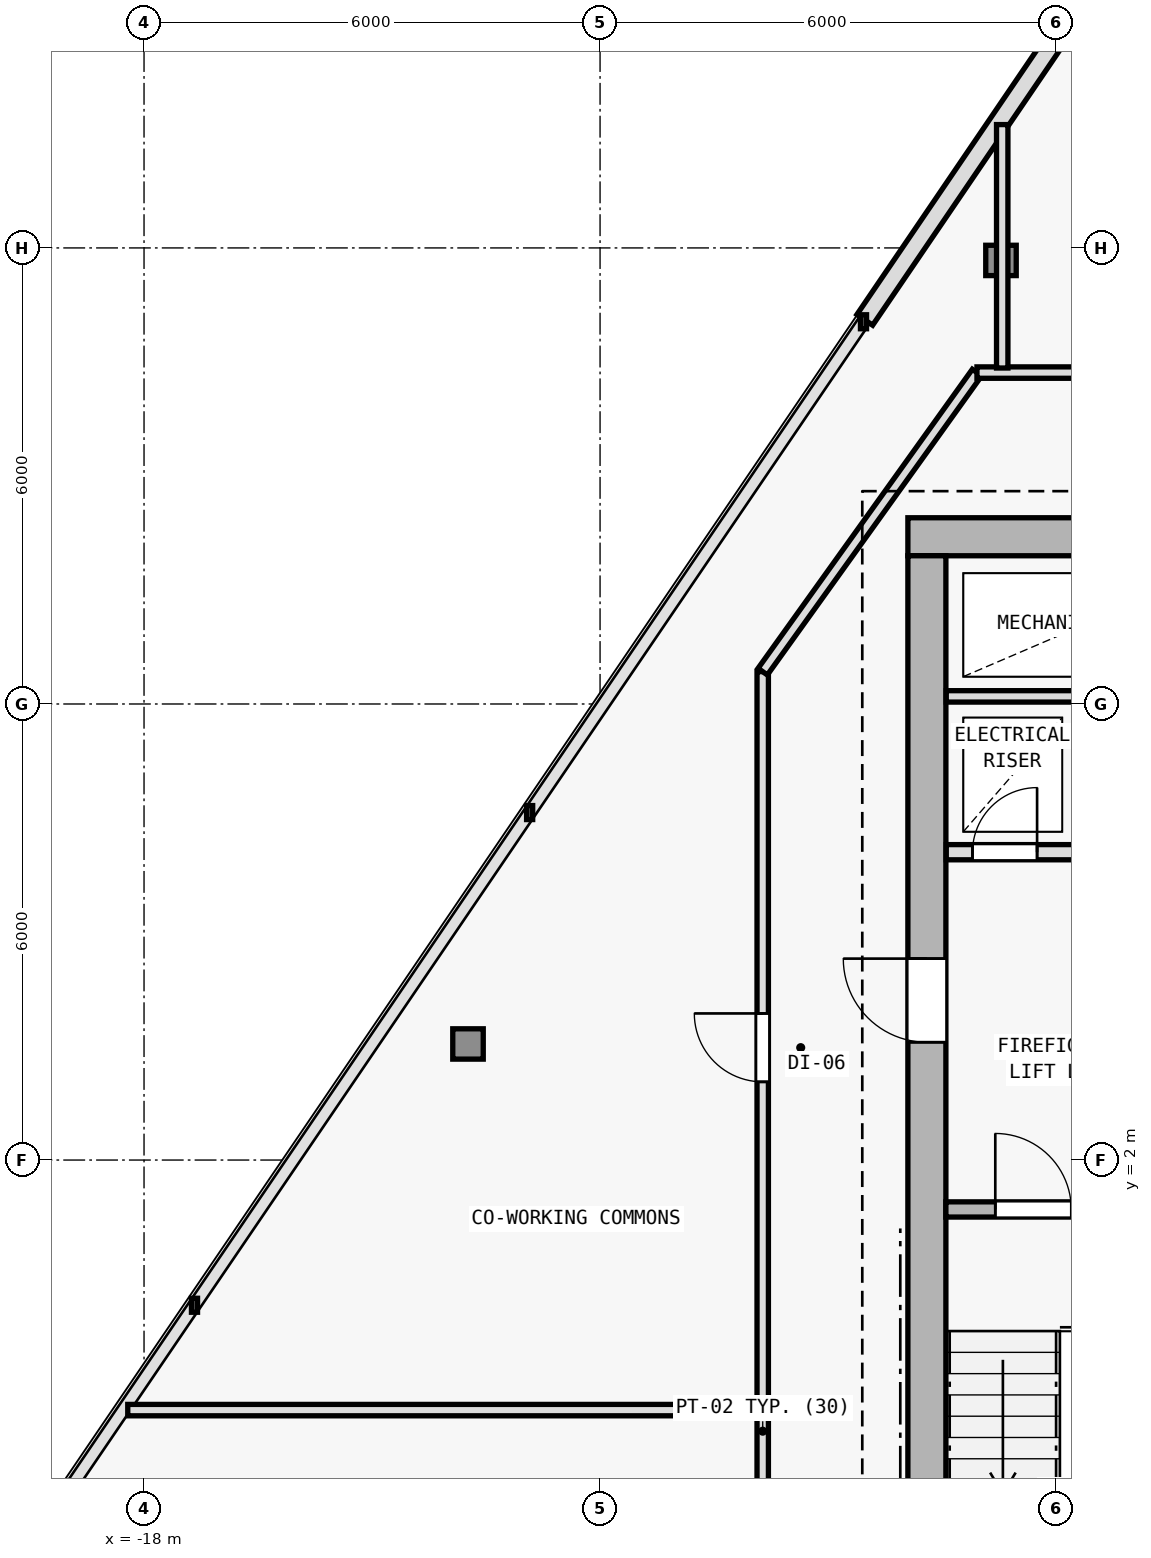
"""IFC4 building model, lengths in metres.
Left out: names, types, materials, properties, quantities, classifications, styles, units other than length and angle.
Written with IfcOpenShell. Run it as: python <this file> out.ifc"""

import sys

from ifc_helpers import new_model, si_unit, direction, frame, frame_2d, origin, origin_2d, place, context, subcontext, project, spatial, rectangle, i_section, extrude, element, fill, save


model = new_model("IFC4")
c1 = context("Model", 3, precision=1e-05, world=origin(), true_north=direction((0.0, 1.0)))
c2 = subcontext(c1, "Body", "Model", "MODEL_VIEW")
j1 = project(units=[si_unit("LENGTHUNIT", "METRE"), si_unit("PLANEANGLEUNIT", "RADIAN")], contexts=[c1])
p1 = place(None, origin())
s1 = spatial("IfcSite", under=j1, at=p1, CompositionType="ELEMENT")
p2 = place(p1, origin())
s2 = spatial("IfcBuilding", under=s1, at=p2, CompositionType="ELEMENT")
p3 = place(p2, frame((0.0, 0.0, 174.6)))
s3 = spatial("IfcBuildingStorey", under=s2, at=p3, CompositionType="ELEMENT", Elevation=174.6)
for number, where, z_axis, x_axis in (
    (1, (-7.7, 10.2, 0.0), (0.0, 0.0, 1.0), (1.0, 0.0, 0.0)),
    (2, (-7.7, 2.0, 0.0), (0.0, 0.0, 1.0), (1.0, 0.0, 0.0)),
):
    element("IfcColumn", number, at=place(p3, frame(where, z_axis=z_axis, x_axis=x_axis)), inside=s3, PredefinedType="COLUMN", context=c2, shape_type="SweptSolid", body=[
        extrude(i_section(OverallWidth=0.404, OverallDepth=0.407, WebThickness=0.017, FlangeThickness=0.028, FilletRadius=0.015, at=origin_2d()), origin(), (0.0, 0.0, 1.0), 3.6),
    ])
p4 = place(p3, frame((-6.725, 13.835, 0.005), z_axis=(0.00911461711, -0.002584742166, 0.999955120424), x_axis=(0.272824100275, 0.962063932548, 0.0)))
e3 = element("IfcColumn", 3, at=p4, inside=s3, PredefinedType="COLUMN", context=c2, shape_type="SweptSolid", body=[
    extrude(i_section(OverallWidth=0.401, OverallDepth=0.399, WebThickness=0.016, FlangeThickness=0.025, FilletRadius=0.015, at=origin_2d()), origin(), (0.0, 0.0, 1.0), 3.589),
])
p5 = place(p3, frame((-13.738, 3.527, 0.005), z_axis=(0.017478283334, 0.009861288262, 0.999798612024), x_axis=(-0.491387103822, 0.870941280568, 0.0)))
e4 = element("IfcColumn", 4, at=p5, inside=s3, PredefinedType="COLUMN", context=c2, shape_type="SweptSolid", body=[
    extrude(i_section(OverallWidth=0.401, OverallDepth=0.399, WebThickness=0.016, FlangeThickness=0.025, FilletRadius=0.015, at=origin_2d()), origin(), (0.0, 0.0, 1.0), 3.59),
])
p6 = place(p3, frame((-8.517, 13.053, 0.0), z_axis=(0.0, 0.0, 1.0), x_axis=(0.562463961516, 0.826821801838, 0.0)))
e5 = element("IfcWall", 5, at=p6, inside=s3, PredefinedType="SOLIDWALL", context=c2, shape_type="SweptSolid", body=[
    extrude(rectangle(XDim=11.018, YDim=0.25, at=frame_2d((5.509, 0.0))), origin(), (0.0, 0.0, 1.0), 3.35),
])
p7 = place(p6, frame((4.709, 0.0, 0.62)))
e6 = element("IfcOpeningElement", 6, at=p7, cuts=e5, PredefinedType="OPENING", context=c2, shape_type="SweptSolid", body=[
    extrude(rectangle(XDim=1.6, YDim=2.1, at=frame_2d((0.8, 1.05))), frame((0.0, 0.135, 0.0), z_axis=(0.0, -1.0, 0.0), x_axis=(1.0, 0.0, 0.0)), (0.0, 0.0, 1.0), 0.27),
])
p8 = place(p3, frame((7.95, 10.2, 0.0), z_axis=(0.0, 0.0, 1.0), x_axis=(-1.0, 0.0, 0.0)))
e7 = element("IfcWall", 7, at=p8, inside=s3, PredefinedType="SHEAR", context=c2, shape_type="SweptSolid", body=[
    extrude(rectangle(XDim=15.9, YDim=0.5, at=frame_2d((7.95, 0.0))), origin(), (0.0, 0.0, 1.0), 3.35),
])
p9 = place(p8, frame((4.4, 0.0, 0.0)))
e8 = element("IfcOpeningElement", 8, at=p9, cuts=e7, PredefinedType="OPENING", context=c2, shape_type="SweptSolid", body=[
    extrude(rectangle(XDim=1.1, YDim=2.15, at=frame_2d((0.55, 1.075))), frame((0.0, 0.26, 0.0), z_axis=(0.0, -1.0, 0.0), x_axis=(1.0, 0.0, 0.0)), (0.0, 0.0, 1.0), 0.52),
])
p10 = place(p3, frame((-7.7, -9.15, 0.0), z_axis=(0.0, 0.0, 1.0), x_axis=(0.0, 1.0, 0.0)))
e9 = element("IfcWall", 9, at=p10, inside=s3, PredefinedType="SHEAR", context=c2, shape_type="SweptSolid", body=[
    extrude(rectangle(XDim=19.1, YDim=0.5, at=frame_2d((9.55, 0.0))), origin(), (0.0, 0.0, 1.0), 3.35),
])
p11 = place(p10, frame((12.7, 0.0, 0.0)))
e10 = element("IfcOpeningElement", 10, at=p11, cuts=e9, PredefinedType="OPENING", context=c2, shape_type="SweptSolid", body=[
    extrude(rectangle(XDim=1.1, YDim=2.15, at=frame_2d((0.55, 1.075))), frame((0.0, 0.26, 0.0), z_axis=(0.0, -1.0, 0.0), x_axis=(1.0, 0.0, 0.0)), (0.0, 0.0, 1.0), 0.52),
])
p12 = place(p3, frame((-7.45, 1.35, 0.0), z_axis=(0.0, 0.0, 1.0), x_axis=(1.0, 0.0, 0.0)))
e11 = element("IfcWall", 11, at=p12, inside=s3, PredefinedType="SOLIDWALL", context=c2, shape_type="SweptSolid", body=[
    extrude(rectangle(XDim=3.4, YDim=0.2, at=frame_2d((1.7, 0.0))), origin(), (0.0, 0.0, 1.0), 3.35),
])
p13 = place(p12, frame((0.65, 0.0, 0.0)))
e12 = element("IfcOpeningElement", 12, at=p13, cuts=e11, PredefinedType="OPENING", context=c2, shape_type="SweptSolid", body=[
    extrude(rectangle(XDim=1.0, YDim=2.15, at=frame_2d((0.5, 1.075))), frame((0.0, 0.11, 0.0), z_axis=(0.0, -1.0, 0.0), x_axis=(1.0, 0.0, 0.0)), (0.0, 0.0, 1.0), 0.22),
])
p14 = place(p3, frame((-7.445, 6.05, 0.0), z_axis=(0.0, 0.0, 1.0), x_axis=(1.0, 0.0, 0.0)))
e13 = element("IfcWall", 13, at=p14, inside=s3, PredefinedType="SOLIDWALL", context=c2, shape_type="SweptSolid", body=[
    extrude(rectangle(XDim=3.595, YDim=0.2, at=frame_2d((1.797, 0.0))), origin(), (0.0, 0.0, 1.0), 3.35),
])
p15 = place(p14, frame((0.345, 0.0, 0.0)))
e14 = element("IfcOpeningElement", 14, at=p15, cuts=e13, PredefinedType="OPENING", context=c2, shape_type="SweptSolid", body=[
    extrude(rectangle(XDim=0.85, YDim=2.1, at=frame_2d((0.425, 1.05))), frame((0.0, 0.11, 0.0), z_axis=(0.0, -1.0, 0.0), x_axis=(1.0, 0.0, 0.0)), (0.0, 0.0, 1.0), 0.22),
])
p16 = place(p14, frame((2.145, 0.0, 0.0)))
e15 = element("IfcOpeningElement", 15, at=p16, cuts=e13, PredefinedType="OPENING", context=c2, shape_type="SweptSolid", body=[
    extrude(rectangle(XDim=0.85, YDim=2.1, at=frame_2d((0.425, 1.05))), frame((0.0, 0.11, 0.0), z_axis=(0.0, -1.0, 0.0), x_axis=(1.0, 0.0, 0.0)), (0.0, 0.0, 1.0), 0.22),
])
p17 = place(p3, frame((-7.445, 8.1, 0.0), z_axis=(0.0, 0.0, 1.0), x_axis=(1.0, 0.0, 0.0)))
e16 = element("IfcWall", 16, at=p17, inside=s3, PredefinedType="PARTITIONING", context=c2, shape_type="SweptSolid", body=[
    extrude(rectangle(XDim=3.595, YDim=0.15, at=frame_2d((1.797, 0.0))), origin(), (0.0, 0.0, 1.0), 3.35),
])
p18 = place(p3, frame((-9.86, -11.56, 0.0), z_axis=(0.0, 0.0, 1.0), x_axis=(0.0, 1.0, 0.0)))
e17 = element("IfcWall", 17, at=p18, inside=s3, PredefinedType="PARTITIONING", context=c2, shape_type="SweptSolid", body=[
    extrude(rectangle(XDim=19.986, YDim=0.15, at=frame_2d((9.993, 0.0))), origin(), (0.0, 0.0, 1.0), 2.825),
])
p19 = place(p18, frame((4.774, 0.0, 0.0)))
e18 = element("IfcOpeningElement", 18, at=p19, cuts=e17, PredefinedType="OPENING", context=c2, shape_type="SweptSolid", body=[
    extrude(rectangle(XDim=0.9, YDim=2.1, at=frame_2d((0.45, 1.05))), frame((0.0, 0.085, 0.0), z_axis=(0.0, -1.0, 0.0), x_axis=(1.0, 0.0, 0.0)), (0.0, 0.0, 1.0), 0.17),
])
p20 = place(p18, frame((14.589, 0.0, 0.0)))
e19 = element("IfcOpeningElement", 19, at=p20, cuts=e17, PredefinedType="OPENING", context=c2, shape_type="SweptSolid", body=[
    extrude(rectangle(XDim=0.9, YDim=2.1, at=frame_2d((0.45, 1.05))), frame((0.0, 0.085, 0.0), z_axis=(0.0, -1.0, 0.0), x_axis=(1.0, 0.0, 0.0)), (0.0, 0.0, 1.0), 0.17),
])
p21 = place(p3, frame((-9.86, 8.426, 0.0), z_axis=(0.0, 0.0, 1.0), x_axis=(0.582449511476, 0.812866881218, 0.0)))
e20 = element("IfcWall", 20, at=p21, inside=s3, PredefinedType="PARTITIONING", context=c2, shape_type="SweptSolid", body=[
    extrude(rectangle(XDim=4.84, YDim=0.15, at=frame_2d((2.42, 0.0))), origin(), (0.0, 0.0, 1.0), 3.005),
])
p22 = place(p3, frame((-7.041, 12.36, 0.0), z_axis=(0.0, 0.0, 1.0), x_axis=(1.0, 0.0, 0.0)))
e21 = element("IfcWall", 21, at=p22, inside=s3, PredefinedType="PARTITIONING", context=c2, shape_type="SweptSolid", body=[
    extrude(rectangle(XDim=14.064, YDim=0.15, at=frame_2d((7.032, 0.0))), origin(), (0.0, 0.0, 1.0), 3.005),
])
p23 = place(p22, frame((12.832, 0.0, 0.0)))
e22 = element("IfcOpeningElement", 22, at=p23, cuts=e21, PredefinedType="OPENING", context=c2, shape_type="SweptSolid", body=[
    extrude(rectangle(XDim=0.85, YDim=2.1, at=frame_2d((0.425, 1.05))), frame((0.0, 0.085, 0.0), z_axis=(0.0, -1.0, 0.0), x_axis=(1.0, 0.0, 0.0)), (0.0, 0.0, 1.0), 0.17),
])
p24 = place(p22, frame((10.355, 0.0, 0.0)))
e23 = element("IfcOpeningElement", 23, at=p24, cuts=e21, PredefinedType="OPENING", context=c2, shape_type="SweptSolid", body=[
    extrude(rectangle(XDim=0.9, YDim=2.1, at=frame_2d((0.45, 1.05))), frame((0.0, 0.085, 0.0), z_axis=(0.0, -1.0, 0.0), x_axis=(1.0, 0.0, 0.0)), (0.0, 0.0, 1.0), 0.17),
])
p25 = place(p22, frame((4.183, 0.0, 0.0)))
e24 = element("IfcOpeningElement", 24, at=p25, cuts=e21, PredefinedType="OPENING", context=c2, shape_type="SweptSolid", body=[
    extrude(rectangle(XDim=0.9, YDim=2.1, at=frame_2d((0.45, 1.05))), frame((0.0, 0.085, 0.0), z_axis=(0.0, -1.0, 0.0), x_axis=(1.0, 0.0, 0.0)), (0.0, 0.0, 1.0), 0.17),
])
p26 = place(p3, frame((-6.709, 12.42, 0.0), z_axis=(0.0, 0.0, 1.0), x_axis=(0.0, 1.0, 0.0)))
e25 = element("IfcWall", 25, at=p26, inside=s3, PredefinedType="PARTITIONING", context=c2, shape_type="SweptSolid", body=[
    extrude(rectangle(XDim=3.203, YDim=0.15, at=frame_2d((1.602, 0.0))), origin(), (0.0, 0.0, 1.0), 2.935),
])
p27 = place(p3, frame((-9.92, -1.29, 0.0), z_axis=(0.0, 0.0, 1.0), x_axis=(-1.0, 0.0, 0.0)))
e26 = element("IfcWall", 26, at=p27, inside=s3, PredefinedType="PARTITIONING", context=c2, shape_type="SweptSolid", body=[
    extrude(rectangle(XDim=8.294, YDim=0.15, at=frame_2d((4.147, 0.0))), origin(), (0.0, 0.0, 1.0), 2.825),
])
p28 = place(p11, origin())
e27 = element("IfcDoor", 27, at=p28, inside=s3, OperationType="SINGLE_SWING_RIGHT", PredefinedType="DOOR", context=c2, shape_type="SweptSolid", body=[
    extrude(rectangle(XDim=1.1, YDim=2.15, at=frame_2d((0.55, 1.075))), frame((0.0, 0.025, 0.0), z_axis=(0.0, -1.0, 0.0), x_axis=(1.0, 0.0, 0.0)), (0.0, 0.0, 1.0), 0.05),
])
fill(e10, e27)
p29 = place(p13, origin())
e28 = element("IfcDoor", 28, at=p29, inside=s3, OperationType="SINGLE_SWING_LEFT", PredefinedType="DOOR", context=c2, shape_type="SweptSolid", body=[
    extrude(rectangle(XDim=1.0, YDim=2.15, at=frame_2d((0.5, 1.075))), frame((0.0, 0.025, 0.0), z_axis=(0.0, -1.0, 0.0), x_axis=(1.0, 0.0, 0.0)), (0.0, 0.0, 1.0), 0.05),
])
fill(e12, e28)
p30 = place(p15, origin())
e29 = element("IfcDoor", 29, at=p30, inside=s3, OperationType="SINGLE_SWING_RIGHT", PredefinedType="DOOR", context=c2, shape_type="SweptSolid", body=[
    extrude(rectangle(XDim=0.85, YDim=2.1, at=frame_2d((0.425, 1.05))), frame((0.0, 0.025, 0.0), z_axis=(0.0, -1.0, 0.0), x_axis=(1.0, 0.0, 0.0)), (0.0, 0.0, 1.0), 0.05),
])
fill(e14, e29)
p31 = place(p20, origin())
e30 = element("IfcDoor", 30, at=p31, inside=s3, OperationType="SINGLE_SWING_RIGHT", PredefinedType="DOOR", context=c2, shape_type="SweptSolid", body=[
    extrude(rectangle(XDim=0.9, YDim=2.1, at=frame_2d((0.45, 1.05))), frame((0.0, 0.025, 0.0), z_axis=(0.0, -1.0, 0.0), x_axis=(1.0, 0.0, 0.0)), (0.0, 0.0, 1.0), 0.05),
])
fill(e19, e30)
save(model, sys.argv[1])
